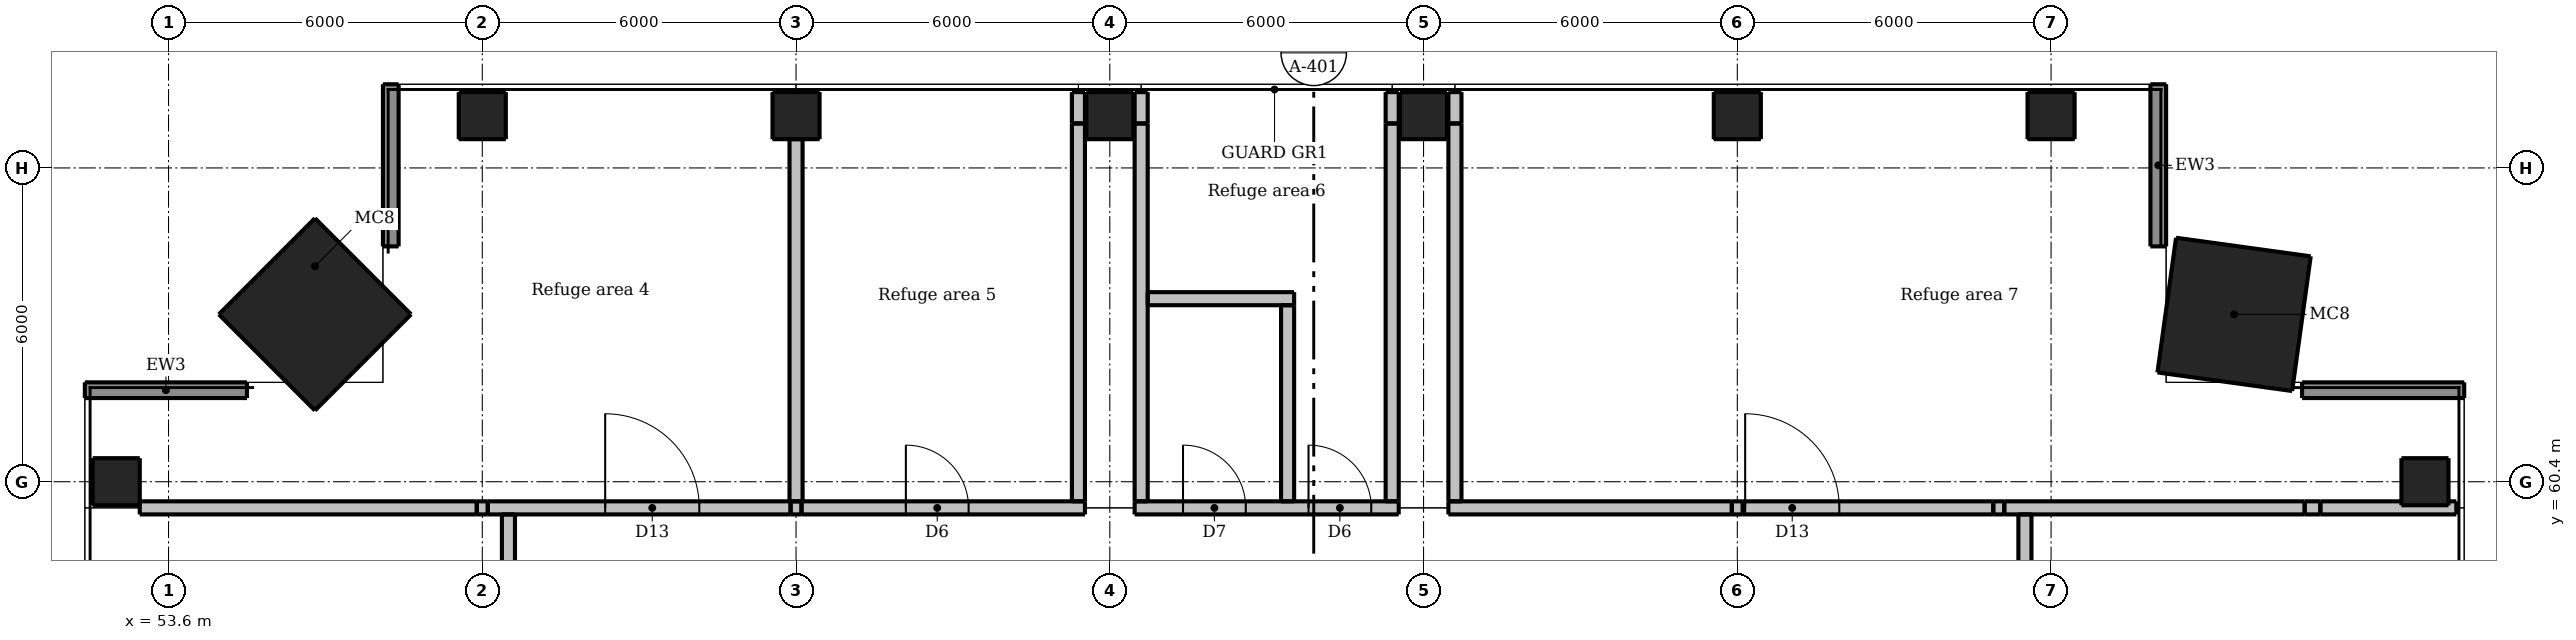
"""IFC4 building model, lengths in metres.
Left out: names, types, materials, properties, quantities, classifications, styles, units other than length and angle.
Written with IfcOpenShell. Run it as: python <this file> out.ifc"""

import sys

from ifc_helpers import new_model, si_unit, direction, frame, frame_2d, origin, origin_2d, place, context, subcontext, project, spatial, rectangle, extrude, element, fill, save


model = new_model("IFC4")
c1 = context("Model", 3, precision=1e-05, world=origin(), true_north=direction((0.0, 1.0)))
c2 = subcontext(c1, "Body", "Model", "MODEL_VIEW")
j1 = project(units=[si_unit("LENGTHUNIT", "METRE"), si_unit("PLANEANGLEUNIT", "RADIAN")], contexts=[c1])
p1 = place(None, origin())
s1 = spatial("IfcSite", under=j1, at=p1, CompositionType="ELEMENT")
p2 = place(p1, origin())
s2 = spatial("IfcBuilding", under=s1, at=p2, CompositionType="ELEMENT")
p3 = place(p2, frame((0.0, 0.0, 229.9)))
s3 = spatial("IfcBuildingStorey", under=s2, at=p3, CompositionType="ELEMENT", Elevation=229.9)
p4 = place(p3, frame((96.75, 60.4, -0.233), z_axis=(-0.25953103544, 0.0, 0.965734767751), x_axis=(0.0, -1.0, 0.0)))
e1 = element("IfcColumn", 1, at=p4, inside=s3, PredefinedType="COLUMN", context=c2, shape_type="SweptSolid", body=[
    extrude(rectangle(XDim=0.9, YDim=0.9, at=origin_2d()), origin(), (0.0, 0.0, 1.0), 9.44),
])
for number, where, z_axis, x_axis in (
    (2, (59.6, 67.4, 0.0), (0.0, 0.0, 1.0), (1.0, 0.0, 0.0)),
    (3, (65.6, 67.4, 0.0), (0.0, 0.0, 1.0), (1.0, 0.0, 0.0)),
    (4, (71.6, 67.4, 0.0), (0.0, 0.0, 1.0), (1.0, 0.0, 0.0)),
    (5, (77.6, 67.4, 0.0), (0.0, 0.0, 1.0), (1.0, 0.0, 0.0)),
    (6, (83.6, 67.4, 0.0), (0.0, 0.0, 1.0), (1.0, 0.0, 0.0)),
):
    element("IfcColumn", number, at=place(p3, frame(where, z_axis=z_axis, x_axis=x_axis)), inside=s3, PredefinedType="COLUMN", context=c2, shape_type="SweptSolid", body=[
        extrude(rectangle(XDim=0.9, YDim=0.9, at=origin_2d()), origin(), (0.0, 0.0, 1.0), 8.75),
    ])
p5 = place(p3, frame((89.6, 67.4, -0.302), z_axis=(-0.107442600408, 0.0, 0.994211289223), x_axis=(0.0, -1.0, 0.0)))
e7 = element("IfcColumn", 7, at=p5, inside=s3, PredefinedType="COLUMN", context=c2, shape_type="SweptSolid", body=[
    extrude(rectangle(XDim=0.9, YDim=0.9, at=origin_2d()), origin(), (0.0, 0.0, 1.0), 9.307),
])
p6 = place(p3, frame((52.6, 60.4, 0.0), z_axis=(0.0, 0.0, 1.0), x_axis=(1.0, 0.0, 0.0)))
e8 = element("IfcColumn", 8, at=p6, inside=s3, PredefinedType="COLUMN", context=c2, shape_type="SweptSolid", body=[
    extrude(rectangle(XDim=0.9, YDim=0.9, at=origin_2d()), origin(), (0.0, 0.0, 1.0), 8.75),
])
p7 = place(p3, frame((93.1, 63.6, 0.504), z_axis=(-0.340740959657, -0.04701358977, 0.938981001293), x_axis=(0.940120564526, -0.008219110333, 0.340742968204)))
e9 = element("IfcColumn", 9, at=p7, inside=s3, PredefinedType="COLUMN", context=c2, shape_type="SweptSolid", body=[
    extrude(rectangle(XDim=2.6, YDim=2.6, at=origin_2d()), origin(), (0.0, 0.0, 1.0), 8.511),
])
p8 = place(p3, frame((56.4, 63.6, 0.118), z_axis=(0.045567316879, -0.045567316879, 0.997921459467), x_axis=(0.001039270266, 0.998960729734, 0.045567316879)))
e10 = element("IfcColumn", 10, at=p8, inside=s3, PredefinedType="COLUMN", context=c2, shape_type="SweptSolid", body=[
    extrude(rectangle(XDim=2.6, YDim=2.6, at=origin_2d()), origin(), (0.0, 0.0, 1.0), 8.781),
])
for number, where, z_axis, x_axis in (
    (11, (97.5, 62.15, 0.0), (0.0, 0.0, 1.0), (-1.0, 0.0, 0.0)),
    (12, (91.65, 64.9, 0.0), (0.0, 0.0, 1.0), (0.0, 1.0, 0.0)),
    (13, (57.85, 68.0, 0.0), (0.0, 0.0, 1.0), (0.0, -1.0, 0.0)),
    (14, (55.1, 62.15, 0.0), (0.0, 0.0, 1.0), (-1.0, 0.0, 0.0)),
):
    element("IfcWall", number, at=place(p3, frame(where, z_axis=z_axis, x_axis=x_axis)), inside=s3, PredefinedType="SOLIDWALL", context=c2, shape_type="SweptSolid", body=[
        extrude(rectangle(XDim=3.1, YDim=0.3, at=frame_2d((1.55, 0.0))), origin(), (0.0, 0.0, 1.0), 8.75),
    ])
p9 = place(p3, frame((53.05, 59.9, 0.0), z_axis=(0.0, 0.0, 1.0), x_axis=(1.0, 0.0, 0.0)))
e15 = element("IfcWall", 15, at=p9, inside=s3, PredefinedType="SOLIDWALL", context=c2, shape_type="SweptSolid", body=[
    extrude(rectangle(XDim=6.445, YDim=0.25, at=frame_2d((3.222, 0.0))), origin(), (0.0, 0.0, 1.0), 8.75),
])
p10 = place(p3, frame((59.495, 59.9, 0.0), z_axis=(0.0, 0.0, 1.0), x_axis=(1.0, 0.0, 0.0)))
e16 = element("IfcWall", 16, at=p10, inside=s3, PredefinedType="SOLIDWALL", context=c2, shape_type="SweptSolid", body=[
    extrude(rectangle(XDim=0.211, YDim=0.25, at=frame_2d((0.105, 0.0))), origin(), (0.0, 0.0, 1.0), 8.211),
])
p11 = place(p3, frame((59.705, 59.9, 0.0), z_axis=(0.0, 0.0, 1.0), x_axis=(1.0, 0.0, 0.0)))
e17 = element("IfcWall", 17, at=p11, inside=s3, PredefinedType="SOLIDWALL", context=c2, shape_type="SweptSolid", body=[
    extrude(rectangle(XDim=5.79, YDim=0.25, at=frame_2d((2.895, 0.0))), origin(), (0.0, 0.0, 1.0), 8.75),
])
p12 = place(p11, frame((2.245, 0.0, 0.0)))
e18 = element("IfcOpeningElement", 18, at=p12, cuts=e17, PredefinedType="OPENING", context=c2, shape_type="SweptSolid", body=[
    extrude(rectangle(XDim=1.8, YDim=2.1, at=frame_2d((0.9, 1.05))), frame((0.0, 0.135, 0.0), z_axis=(0.0, -1.0, 0.0), x_axis=(1.0, 0.0, 0.0)), (0.0, 0.0, 1.0), 0.27),
])
p13 = place(p3, frame((65.495, 59.9, 0.0), z_axis=(0.0, 0.0, 1.0), x_axis=(1.0, 0.0, 0.0)))
e19 = element("IfcWall", 19, at=p13, inside=s3, PredefinedType="SOLIDWALL", context=c2, shape_type="SweptSolid", body=[
    extrude(rectangle(XDim=0.209, YDim=0.25, at=frame_2d((0.104, 0.0))), origin(), (0.0, 0.0, 1.0), 8.217),
])
p14 = place(p3, frame((65.705, 59.9, 0.0), z_axis=(0.0, 0.0, 1.0), x_axis=(1.0, 0.0, 0.0)))
e20 = element("IfcWall", 20, at=p14, inside=s3, PredefinedType="SOLIDWALL", context=c2, shape_type="SweptSolid", body=[
    extrude(rectangle(XDim=5.42, YDim=0.25, at=frame_2d((2.71, 0.0))), origin(), (0.0, 0.0, 1.0), 8.75),
])
p15 = place(p14, frame((1.995, 0.0, 0.0)))
e21 = element("IfcOpeningElement", 21, at=p15, cuts=e20, PredefinedType="OPENING", context=c2, shape_type="SweptSolid", body=[
    extrude(rectangle(XDim=1.2, YDim=2.1, at=frame_2d((0.6, 1.05))), frame((0.0, 0.135, 0.0), z_axis=(0.0, -1.0, 0.0), x_axis=(1.0, 0.0, 0.0)), (0.0, 0.0, 1.0), 0.27),
])
p16 = place(p3, frame((72.075, 59.9, 0.0), z_axis=(0.0, 0.0, 1.0), x_axis=(1.0, 0.0, 0.0)))
e22 = element("IfcWall", 22, at=p16, inside=s3, PredefinedType="SOLIDWALL", context=c2, shape_type="SweptSolid", body=[
    extrude(rectangle(XDim=5.05, YDim=0.25, at=frame_2d((2.525, 0.0))), origin(), (0.0, 0.0, 1.0), 8.75),
])
p17 = place(p16, frame((0.925, 0.0, 0.0)))
e23 = element("IfcOpeningElement", 23, at=p17, cuts=e22, PredefinedType="OPENING", context=c2, shape_type="SweptSolid", body=[
    extrude(rectangle(XDim=1.2, YDim=2.1, at=frame_2d((0.6, 1.05))), frame((0.0, 0.135, 0.0), z_axis=(0.0, -1.0, 0.0), x_axis=(1.0, 0.0, 0.0)), (0.0, 0.0, 1.0), 0.27),
])
p18 = place(p16, frame((3.325, 0.0, 0.0)))
e24 = element("IfcOpeningElement", 24, at=p18, cuts=e22, PredefinedType="OPENING", context=c2, shape_type="SweptSolid", body=[
    extrude(rectangle(XDim=1.2, YDim=2.1, at=frame_2d((0.6, 1.05))), frame((0.0, 0.135, 0.0), z_axis=(0.0, -1.0, 0.0), x_axis=(1.0, 0.0, 0.0)), (0.0, 0.0, 1.0), 0.27),
])
p19 = place(p3, frame((78.075, 59.9, 0.0), z_axis=(0.0, 0.0, 1.0), x_axis=(1.0, 0.0, 0.0)))
e25 = element("IfcWall", 25, at=p19, inside=s3, PredefinedType="SOLIDWALL", context=c2, shape_type="SweptSolid", body=[
    extrude(rectangle(XDim=5.42, YDim=0.25, at=frame_2d((2.71, 0.0))), origin(), (0.0, 0.0, 1.0), 8.75),
])
p20 = place(p3, frame((83.495, 59.9, 0.0), z_axis=(0.0, 0.0, 1.0), x_axis=(1.0, 0.0, 0.0)))
e26 = element("IfcWall", 26, at=p20, inside=s3, PredefinedType="SOLIDWALL", context=c2, shape_type="SweptSolid", body=[
    extrude(rectangle(XDim=0.209, YDim=0.25, at=frame_2d((0.104, 0.0))), origin(), (0.0, 0.0, 1.0), 8.217),
])
p21 = place(p3, frame((83.705, 59.9, 0.0), z_axis=(0.0, 0.0, 1.0), x_axis=(1.0, 0.0, 0.0)))
e27 = element("IfcWall", 27, at=p21, inside=s3, PredefinedType="SOLIDWALL", context=c2, shape_type="SweptSolid", body=[
    extrude(rectangle(XDim=4.79, YDim=0.25, at=frame_2d((2.395, 0.0))), origin(), (0.0, 0.0, 1.0), 8.75),
])
p22 = place(p21, frame((0.045, 0.0, 0.0)))
e28 = element("IfcOpeningElement", 28, at=p22, cuts=e27, PredefinedType="OPENING", context=c2, shape_type="SweptSolid", body=[
    extrude(rectangle(XDim=1.8, YDim=2.1, at=frame_2d((0.9, 1.05))), frame((0.0, 0.135, 0.0), z_axis=(0.0, -1.0, 0.0), x_axis=(1.0, 0.0, 0.0)), (0.0, 0.0, 1.0), 0.27),
])
p23 = place(p3, frame((88.495, 59.9, 0.0), z_axis=(0.0, 0.0, 1.0), x_axis=(1.0, 0.0, 0.0)))
e29 = element("IfcWall", 29, at=p23, inside=s3, PredefinedType="SOLIDWALL", context=c2, shape_type="SweptSolid", body=[
    extrude(rectangle(XDim=0.211, YDim=0.25, at=frame_2d((0.105, 0.0))), origin(), (0.0, 0.0, 1.0), 8.211),
])
p24 = place(p3, frame((88.705, 59.9, 0.0), z_axis=(0.0, 0.0, 1.0), x_axis=(1.0, 0.0, 0.0)))
e30 = element("IfcWall", 30, at=p24, inside=s3, PredefinedType="SOLIDWALL", context=c2, shape_type="SweptSolid", body=[
    extrude(rectangle(XDim=5.745, YDim=0.25, at=frame_2d((2.872, 0.0))), origin(), (0.0, 0.0, 1.0), 8.75),
])
p25 = place(p3, frame((94.45, 59.9, 0.0), z_axis=(0.0, 0.0, 1.0), x_axis=(1.0, 0.0, 0.0)))
e31 = element("IfcWall", 31, at=p25, inside=s3, PredefinedType="SOLIDWALL", context=c2, shape_type="SweptSolid", body=[
    extrude(rectangle(XDim=0.3, YDim=0.25, at=frame_2d((0.15, 0.0))), origin(), (0.0, 0.0, 1.0), 8.25),
])
p26 = place(p3, frame((94.75, 59.9, 0.0), z_axis=(0.0, 0.0, 1.0), x_axis=(1.0, 0.0, 0.0)))
e32 = element("IfcWall", 32, at=p26, inside=s3, PredefinedType="SOLIDWALL", context=c2, shape_type="SweptSolid", body=[
    extrude(rectangle(XDim=2.6, YDim=0.25, at=frame_2d((1.3, 0.0))), origin(), (0.0, 0.0, 1.0), 8.75),
])
p27 = place(p3, frame((72.325, 63.9, 0.0), z_axis=(0.0, 0.0, 1.0), x_axis=(1.0, 0.0, 0.0)))
e33 = element("IfcWall", 33, at=p27, inside=s3, PredefinedType="SOLIDWALL", context=c2, shape_type="SweptSolid", body=[
    extrude(rectangle(XDim=2.8, YDim=0.25, at=frame_2d((1.4, 0.0))), origin(), (0.0, 0.0, 1.0), 8.75),
])
p28 = place(p3, frame((60.1, 54.505, 0.0), z_axis=(0.0, 0.0, 1.0), x_axis=(0.0, 1.0, 0.0)))
e34 = element("IfcWall", 34, at=p28, inside=s3, PredefinedType="SOLIDWALL", context=c2, shape_type="SweptSolid", body=[
    extrude(rectangle(XDim=5.27, YDim=0.25, at=frame_2d((2.635, 0.0))), origin(), (0.0, 0.0, 1.0), 8.75),
])
p29 = place(p28, frame((0.045, 0.0, 0.0)))
e35 = element("IfcOpeningElement", 35, at=p29, cuts=e34, PredefinedType="OPENING", context=c2, shape_type="SweptSolid", body=[
    extrude(rectangle(XDim=1.8, YDim=2.1, at=frame_2d((0.9, 1.05))), frame((0.0, 0.135, 0.0), z_axis=(0.0, -1.0, 0.0), x_axis=(1.0, 0.0, 0.0)), (0.0, 0.0, 1.0), 0.27),
])
p30 = place(p3, frame((65.6, 60.025, 0.0), z_axis=(0.0, 0.0, 1.0), x_axis=(0.0, 1.0, 0.0)))
e36 = element("IfcWall", 36, at=p30, inside=s3, PredefinedType="SOLIDWALL", context=c2, shape_type="SweptSolid", body=[
    extrude(rectangle(XDim=6.925, YDim=0.25, at=frame_2d((3.462, 0.0))), origin(), (0.0, 0.0, 1.0), 8.217),
])
p31 = place(p3, frame((71.0, 60.025, 0.0), z_axis=(0.0, 0.0, 1.0), x_axis=(0.0, 1.0, 0.0)))
e37 = element("IfcWall", 37, at=p31, inside=s3, PredefinedType="SOLIDWALL", context=c2, shape_type="SweptSolid", body=[
    extrude(rectangle(XDim=7.225, YDim=0.25, at=frame_2d((3.613, 0.0))), origin(), (0.0, 0.0, 1.0), 8.75),
])
p32 = place(p3, frame((71.0, 67.25, 0.0), z_axis=(0.0, 0.0, 1.0), x_axis=(0.0, 1.0, 0.0)))
e38 = element("IfcWall", 38, at=p32, inside=s3, PredefinedType="SOLIDWALL", context=c2, shape_type="SweptSolid", body=[
    extrude(rectangle(XDim=0.6, YDim=0.25, at=frame_2d((0.3, 0.0))), origin(), (0.0, 0.0, 1.0), 8.25),
])
p33 = place(p3, frame((72.2, 60.025, 0.0), z_axis=(0.0, 0.0, 1.0), x_axis=(0.0, 1.0, 0.0)))
e39 = element("IfcWall", 39, at=p33, inside=s3, PredefinedType="SOLIDWALL", context=c2, shape_type="SweptSolid", body=[
    extrude(rectangle(XDim=7.225, YDim=0.25, at=frame_2d((3.613, 0.0))), origin(), (0.0, 0.0, 1.0), 8.75),
])
p34 = place(p3, frame((72.2, 67.25, 0.0), z_axis=(0.0, 0.0, 1.0), x_axis=(0.0, 1.0, 0.0)))
e40 = element("IfcWall", 40, at=p34, inside=s3, PredefinedType="SOLIDWALL", context=c2, shape_type="SweptSolid", body=[
    extrude(rectangle(XDim=0.6, YDim=0.25, at=frame_2d((0.3, 0.0))), origin(), (0.0, 0.0, 1.0), 8.25),
])
p35 = place(p3, frame((75.0, 60.025, 0.0), z_axis=(0.0, 0.0, 1.0), x_axis=(0.0, 1.0, 0.0)))
e41 = element("IfcWall", 41, at=p35, inside=s3, PredefinedType="SOLIDWALL", context=c2, shape_type="SweptSolid", body=[
    extrude(rectangle(XDim=3.75, YDim=0.25, at=frame_2d((1.875, 0.0))), origin(), (0.0, 0.0, 1.0), 8.75),
])
p36 = place(p3, frame((77.0, 60.025, 0.0), z_axis=(0.0, 0.0, 1.0), x_axis=(0.0, 1.0, 0.0)))
e42 = element("IfcWall", 42, at=p36, inside=s3, PredefinedType="SOLIDWALL", context=c2, shape_type="SweptSolid", body=[
    extrude(rectangle(XDim=7.225, YDim=0.25, at=frame_2d((3.613, 0.0))), origin(), (0.0, 0.0, 1.0), 8.75),
])
p37 = place(p3, frame((77.0, 67.25, 0.0), z_axis=(0.0, 0.0, 1.0), x_axis=(0.0, 1.0, 0.0)))
e43 = element("IfcWall", 43, at=p37, inside=s3, PredefinedType="SOLIDWALL", context=c2, shape_type="SweptSolid", body=[
    extrude(rectangle(XDim=0.6, YDim=0.25, at=frame_2d((0.3, 0.0))), origin(), (0.0, 0.0, 1.0), 8.25),
])
p38 = place(p3, frame((78.2, 60.025, 0.0), z_axis=(0.0, 0.0, 1.0), x_axis=(0.0, 1.0, 0.0)))
e44 = element("IfcWall", 44, at=p38, inside=s3, PredefinedType="SOLIDWALL", context=c2, shape_type="SweptSolid", body=[
    extrude(rectangle(XDim=7.225, YDim=0.25, at=frame_2d((3.613, 0.0))), origin(), (0.0, 0.0, 1.0), 8.75),
])
p39 = place(p3, frame((78.2, 67.25, 0.0), z_axis=(0.0, 0.0, 1.0), x_axis=(0.0, 1.0, 0.0)))
e45 = element("IfcWall", 45, at=p39, inside=s3, PredefinedType="SOLIDWALL", context=c2, shape_type="SweptSolid", body=[
    extrude(rectangle(XDim=0.6, YDim=0.25, at=frame_2d((0.3, 0.0))), origin(), (0.0, 0.0, 1.0), 8.25),
])
p40 = place(p3, frame((89.1, 54.496, 0.0), z_axis=(0.0, 0.0, 1.0), x_axis=(0.0, 1.0, 0.0)))
e46 = element("IfcWall", 46, at=p40, inside=s3, PredefinedType="SOLIDWALL", context=c2, shape_type="SweptSolid", body=[
    extrude(rectangle(XDim=5.279, YDim=0.25, at=frame_2d((2.64, 0.0))), origin(), (0.0, 0.0, 1.0), 8.75),
])
p41 = place(p40, frame((0.054, 0.0, 0.0)))
e47 = element("IfcOpeningElement", 47, at=p41, cuts=e46, PredefinedType="OPENING", context=c2, shape_type="SweptSolid", body=[
    extrude(rectangle(XDim=1.8, YDim=2.1, at=frame_2d((0.9, 1.05))), frame((0.0, 0.135, 0.0), z_axis=(0.0, -1.0, 0.0), x_axis=(1.0, 0.0, 0.0)), (0.0, 0.0, 1.0), 0.27),
])
p42 = place(p12, origin())
e48 = element("IfcDoor", 48, at=p42, inside=s3, OperationType="DOUBLE_DOOR_SINGLE_SWING", PredefinedType="DOOR", context=c2, shape_type="SweptSolid", body=[
    extrude(rectangle(XDim=1.8, YDim=2.1, at=frame_2d((0.9, 1.05))), frame((0.0, 0.025, 0.0), z_axis=(0.0, -1.0, 0.0), x_axis=(1.0, 0.0, 0.0)), (0.0, 0.0, 1.0), 0.05),
])
fill(e18, e48)
p43 = place(p15, origin())
e49 = element("IfcDoor", 49, at=p43, inside=s3, OperationType="SINGLE_SWING_LEFT", PredefinedType="DOOR", context=c2, shape_type="SweptSolid", body=[
    extrude(rectangle(XDim=1.2, YDim=2.1, at=frame_2d((0.6, 1.05))), frame((0.0, 0.025, 0.0), z_axis=(0.0, -1.0, 0.0), x_axis=(1.0, 0.0, 0.0)), (0.0, 0.0, 1.0), 0.05),
])
fill(e21, e49)
p44 = place(p17, origin())
e50 = element("IfcDoor", 50, at=p44, inside=s3, OperationType="SINGLE_SWING_LEFT", PredefinedType="DOOR", context=c2, shape_type="SweptSolid", body=[
    extrude(rectangle(XDim=1.2, YDim=2.1, at=frame_2d((0.6, 1.05))), frame((0.0, 0.025, 0.0), z_axis=(0.0, -1.0, 0.0), x_axis=(1.0, 0.0, 0.0)), (0.0, 0.0, 1.0), 0.05),
])
fill(e23, e50)
p45 = place(p18, origin())
e51 = element("IfcDoor", 51, at=p45, inside=s3, OperationType="SINGLE_SWING_LEFT", PredefinedType="DOOR", context=c2, shape_type="SweptSolid", body=[
    extrude(rectangle(XDim=1.2, YDim=2.1, at=frame_2d((0.6, 1.05))), frame((0.0, 0.025, 0.0), z_axis=(0.0, -1.0, 0.0), x_axis=(1.0, 0.0, 0.0)), (0.0, 0.0, 1.0), 0.05),
])
fill(e24, e51)
p46 = place(p22, origin())
e52 = element("IfcDoor", 52, at=p46, inside=s3, OperationType="DOUBLE_DOOR_SINGLE_SWING", PredefinedType="DOOR", context=c2, shape_type="SweptSolid", body=[
    extrude(rectangle(XDim=1.8, YDim=2.1, at=frame_2d((0.9, 1.05))), frame((0.0, 0.025, 0.0), z_axis=(0.0, -1.0, 0.0), x_axis=(1.0, 0.0, 0.0)), (0.0, 0.0, 1.0), 0.05),
])
fill(e28, e52)
save(model, sys.argv[1])
